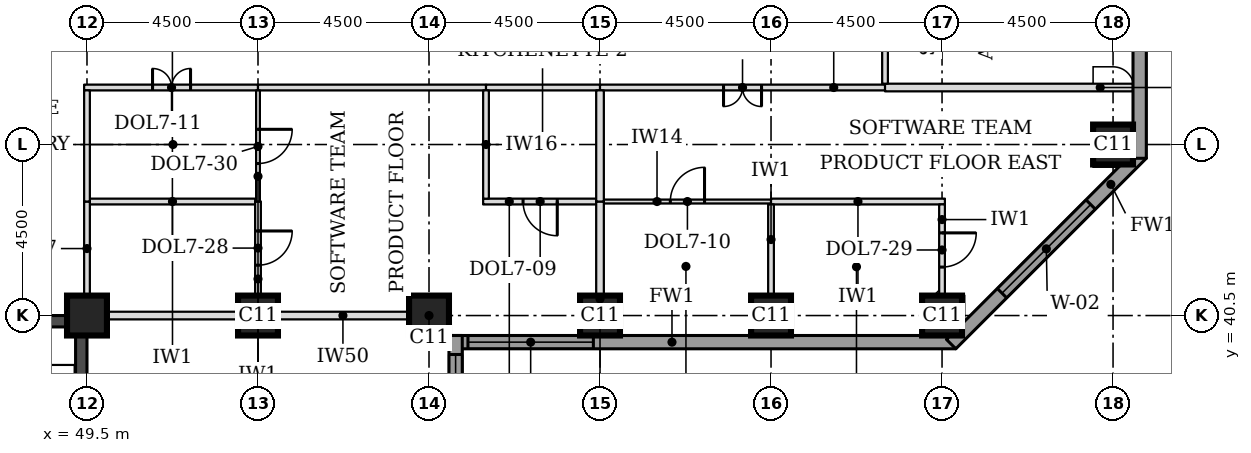
"""IFC4 building model, lengths in metres.
Left out: names, types, materials, properties, quantities, classifications, styles, units other than length and angle.
Written with IfcOpenShell. Run it as: python <this file> out.ifc"""

import sys

from ifc_helpers import new_model, si_unit, direction, frame, frame_2d, origin, origin_2d, place, context, subcontext, project, spatial, rectangle, extrude, element, fill, save


model = new_model("IFC4")
c1 = context("Model", 3, precision=1e-05, world=origin(), true_north=direction((0.0, 1.0)))
c2 = subcontext(c1, "Body", "Model", "MODEL_VIEW")
j1 = project(units=[si_unit("LENGTHUNIT", "METRE"), si_unit("PLANEANGLEUNIT", "RADIAN")], contexts=[c1])
p1 = place(None, origin())
s1 = spatial("IfcSite", under=j1, at=p1, CompositionType="ELEMENT")
p2 = place(p1, origin())
s2 = spatial("IfcBuilding", under=s1, at=p2, CompositionType="ELEMENT")
p3 = place(p2, frame((0.0, 0.0, 130.7)))
s3 = spatial("IfcBuildingStorey", under=s2, at=p3, CompositionType="ELEMENT", Elevation=130.7)
for number, where, z_axis, x_axis in (
    (1, (49.5, 40.5, 0.0), (0.0, 0.0, 1.0), (1.0, 0.0, 0.0)),
    (2, (54.0, 40.5, 0.0), (0.0, 0.0, 1.0), (1.0, 0.0, 0.0)),
    (3, (58.5, 40.5, 0.0), (0.0, 0.0, 1.0), (1.0, 0.0, 0.0)),
    (4, (63.0, 40.5, 0.0), (0.0, 0.0, 1.0), (1.0, 0.0, 0.0)),
    (5, (67.5, 40.5, 0.0), (0.0, 0.0, 1.0), (1.0, 0.0, 0.0)),
    (6, (72.0, 40.5, 0.0), (0.0, 0.0, 1.0), (1.0, 0.0, 0.0)),
    (7, (76.5, 45.0, 0.0), (0.0, 0.0, 1.0), (1.0, 0.0, 0.0)),
):
    element("IfcColumn", number, at=place(p3, frame(where, z_axis=z_axis, x_axis=x_axis)), inside=s3, PredefinedType="COLUMN", context=c2, shape_type="SweptSolid", body=[
        extrude(rectangle(XDim=1.05, YDim=1.05, at=origin_2d()), origin(), (0.0, 0.0, 1.0), 3.7),
    ])
p4 = place(p3, frame((40.8, 40.35, 0.0), z_axis=(0.0, 0.0, 1.0), x_axis=(1.0, 0.0, 0.0)))
e8 = element("IfcWall", 8, at=p4, inside=s3, PredefinedType="SHEAR", context=c2, shape_type="SweptSolid", body=[
    extrude(rectangle(XDim=8.4, YDim=0.3, at=frame_2d((4.2, 0.0))), origin(), (0.0, 0.0, 1.0), 3.7),
])
p5 = place(p4, frame((6.4, 0.0, 0.0)))
e9 = element("IfcOpeningElement", 9, at=p5, cuts=e8, PredefinedType="OPENING", context=c2, shape_type="SweptSolid", body=[
    extrude(rectangle(XDim=1.1, YDim=2.1, at=frame_2d((0.55, 1.05))), frame((0.0, 0.16, 0.0), z_axis=(0.0, -1.0, 0.0), x_axis=(1.0, 0.0, 0.0)), (0.0, 0.0, 1.0), 0.32),
])
p6 = place(p3, frame((49.35, 31.5, 0.0), z_axis=(0.0, 0.0, 1.0), x_axis=(0.0, 1.0, 0.0)))
e10 = element("IfcWall", 10, at=p6, inside=s3, PredefinedType="SHEAR", context=c2, shape_type="SweptSolid", body=[
    extrude(rectangle(XDim=9.0, YDim=0.3, at=frame_2d((4.5, 0.0))), origin(), (0.0, 0.0, 1.0), 3.7),
])
p7 = place(p3, frame((59.025, 39.8, 0.0), z_axis=(0.0, 0.0, 1.0), x_axis=(1.0, 0.0, 0.0)))
e11 = element("IfcWall", 11, at=p7, inside=s3, PredefinedType="STANDARD", context=c2, shape_type="SweptSolid", body=[
    extrude(rectangle(XDim=13.337, YDim=0.35, at=frame_2d((6.669, 0.0))), origin(), (0.0, 0.0, 1.0), 3.525),
])
p8 = place(p7, frame((0.5, 0.0, 0.9)))
e12 = element("IfcOpeningElement", 12, at=p8, cuts=e11, PredefinedType="OPENING", context=c2, shape_type="SweptSolid", body=[
    extrude(rectangle(XDim=3.3, YDim=1.9, at=frame_2d((1.65, 0.95))), frame((0.0, 0.185, 0.0), z_axis=(0.0, -1.0, 0.0), x_axis=(1.0, 0.0, 0.0)), (0.0, 0.0, 1.0), 0.37),
])
p9 = place(p3, frame((72.239, 39.749, 0.0), z_axis=(0.0, 0.0, 1.0), x_axis=(0.707106781187, 0.707106781187, 0.0)))
e13 = element("IfcWall", 13, at=p9, inside=s3, PredefinedType="STANDARD", context=c2, shape_type="SweptSolid", body=[
    extrude(rectangle(XDim=7.089, YDim=0.35, at=frame_2d((3.544, 0.0))), origin(), (0.0, 0.0, 1.0), 3.525),
])
p10 = place(p9, frame((1.894, 0.0, 0.9)))
e14 = element("IfcOpeningElement", 14, at=p10, cuts=e13, PredefinedType="OPENING", context=c2, shape_type="SweptSolid", body=[
    extrude(rectangle(XDim=3.3, YDim=1.9, at=frame_2d((1.65, 0.95))), frame((0.0, 0.185, 0.0), z_axis=(0.0, -1.0, 0.0), x_axis=(1.0, 0.0, 0.0)), (0.0, 0.0, 1.0), 0.37),
])
p11 = place(p3, frame((77.2, 44.638, 0.0), z_axis=(0.0, 0.0, 1.0), x_axis=(0.0, 1.0, 0.0)))
e15 = element("IfcWall", 15, at=p11, inside=s3, PredefinedType="STANDARD", context=c2, shape_type="SweptSolid", body=[
    extrude(rectangle(XDim=32.225, YDim=0.35, at=frame_2d((16.112, 0.0))), origin(), (0.0, 0.0, 1.0), 3.525),
])
p12 = place(p11, frame((5.462, 0.0, 0.9)))
e16 = element("IfcOpeningElement", 16, at=p12, cuts=e15, PredefinedType="OPENING", context=c2, shape_type="SweptSolid", body=[
    extrude(rectangle(XDim=3.3, YDim=1.9, at=frame_2d((1.65, 0.95))), frame((0.0, 0.185, 0.0), z_axis=(0.0, -1.0, 0.0), x_axis=(1.0, 0.0, 0.0)), (0.0, 0.0, 1.0), 0.37),
])
p13 = place(p11, frame((9.962, 0.0, 0.9)))
e17 = element("IfcOpeningElement", 17, at=p13, cuts=e15, PredefinedType="OPENING", context=c2, shape_type="SweptSolid", body=[
    extrude(rectangle(XDim=3.3, YDim=1.9, at=frame_2d((1.65, 0.95))), frame((0.0, 0.185, 0.0), z_axis=(0.0, -1.0, 0.0), x_axis=(1.0, 0.0, 0.0)), (0.0, 0.0, 1.0), 0.37),
])
p14 = place(p11, frame((14.462, 0.0, 0.9)))
e18 = element("IfcOpeningElement", 18, at=p14, cuts=e15, PredefinedType="OPENING", context=c2, shape_type="SweptSolid", body=[
    extrude(rectangle(XDim=3.3, YDim=1.9, at=frame_2d((1.65, 0.95))), frame((0.0, 0.185, 0.0), z_axis=(0.0, -1.0, 0.0), x_axis=(1.0, 0.0, 0.0)), (0.0, 0.0, 1.0), 0.37),
])
p15 = place(p11, frame((18.962, 0.0, 0.9)))
e19 = element("IfcOpeningElement", 19, at=p15, cuts=e15, PredefinedType="OPENING", context=c2, shape_type="SweptSolid", body=[
    extrude(rectangle(XDim=3.3, YDim=1.9, at=frame_2d((1.65, 0.95))), frame((0.0, 0.185, 0.0), z_axis=(0.0, -1.0, 0.0), x_axis=(1.0, 0.0, 0.0)), (0.0, 0.0, 1.0), 0.37),
])
p16 = place(p11, frame((23.462, 0.0, 0.9)))
e20 = element("IfcOpeningElement", 20, at=p16, cuts=e15, PredefinedType="OPENING", context=c2, shape_type="SweptSolid", body=[
    extrude(rectangle(XDim=3.3, YDim=1.9, at=frame_2d((1.65, 0.95))), frame((0.0, 0.185, 0.0), z_axis=(0.0, -1.0, 0.0), x_axis=(1.0, 0.0, 0.0)), (0.0, 0.0, 1.0), 0.37),
])
p17 = place(p3, frame((59.2, 22.138, 0.0), z_axis=(0.0, 0.0, 1.0), x_axis=(0.0, 1.0, 0.0)))
e21 = element("IfcWall", 21, at=p17, inside=s3, PredefinedType="STANDARD", context=c2, shape_type="SweptSolid", body=[
    extrude(rectangle(XDim=17.837, YDim=0.35, at=frame_2d((8.919, 0.0))), origin(), (0.0, 0.0, 1.0), 3.525),
])
p18 = place(p17, frame((5.462, 0.0, 0.9)))
e22 = element("IfcOpeningElement", 22, at=p18, cuts=e21, PredefinedType="OPENING", context=c2, shape_type="SweptSolid", body=[
    extrude(rectangle(XDim=3.3, YDim=1.9, at=frame_2d((1.65, 0.95))), frame((0.0, 0.185, 0.0), z_axis=(0.0, -1.0, 0.0), x_axis=(1.0, 0.0, 0.0)), (0.0, 0.0, 1.0), 0.37),
])
p19 = place(p17, frame((14.037, 0.0, 0.9)))
e23 = element("IfcOpeningElement", 23, at=p19, cuts=e21, PredefinedType="OPENING", context=c2, shape_type="SweptSolid", body=[
    extrude(rectangle(XDim=3.3, YDim=1.9, at=frame_2d((1.65, 0.95))), frame((0.0, 0.185, 0.0), z_axis=(0.0, -1.0, 0.0), x_axis=(1.0, 0.0, 0.0)), (0.0, 0.0, 1.0), 0.37),
])
p20 = place(p3, frame((50.015, 40.5, 0.0), z_axis=(0.0, 0.0, 1.0), x_axis=(1.0, 0.0, 0.0)))
e24 = element("IfcWall", 24, at=p20, inside=s3, PredefinedType="PARTITIONING", context=c2, shape_type="SweptSolid", body=[
    extrude(rectangle(XDim=3.46, YDim=0.2, at=frame_2d((1.73, 0.0))), origin(), (0.0, 0.0, 1.0), 2.8),
])
p21 = place(p3, frame((54.495, 40.5, 0.0), z_axis=(0.0, 0.0, 1.0), x_axis=(1.0, 0.0, 0.0)))
e25 = element("IfcWall", 25, at=p21, inside=s3, PredefinedType="PARTITIONING", context=c2, shape_type="SweptSolid", body=[
    extrude(rectangle(XDim=3.48, YDim=0.2, at=frame_2d((1.74, 0.0))), origin(), (0.0, 0.0, 1.0), 2.8),
])
p22 = place(p3, frame((49.575, 43.5, 0.0), z_axis=(0.0, 0.0, 1.0), x_axis=(1.0, 0.0, 0.0)))
e26 = element("IfcWall", 26, at=p22, inside=s3, PredefinedType="PARTITIONING", context=c2, shape_type="SweptSolid", body=[
    extrude(rectangle(XDim=4.35, YDim=0.15, at=frame_2d((2.175, 0.0))), origin(), (0.0, 0.0, 1.0), 3.55),
])
p23 = place(p3, frame((59.925, 43.5, 0.0), z_axis=(0.0, 0.0, 1.0), x_axis=(1.0, 0.0, 0.0)))
e27 = element("IfcWall", 27, at=p23, inside=s3, PredefinedType="PARTITIONING", context=c2, shape_type="SweptSolid", body=[
    extrude(rectangle(XDim=2.975, YDim=0.15, at=frame_2d((1.487, 0.0))), origin(), (0.0, 0.0, 1.0), 3.55),
])
p24 = place(p23, frame((1.05, 0.0, 0.0)))
e28 = element("IfcOpeningElement", 28, at=p24, cuts=e27, PredefinedType="OPENING", context=c2, shape_type="SweptSolid", body=[
    extrude(rectangle(XDim=0.9, YDim=2.1, at=frame_2d((0.45, 1.05))), frame((0.0, 0.085, 0.0), z_axis=(0.0, -1.0, 0.0), x_axis=(1.0, 0.0, 0.0)), (0.0, 0.0, 1.0), 0.17),
])
p25 = place(p3, frame((63.1, 43.5, 0.0), z_axis=(0.0, 0.0, 1.0), x_axis=(1.0, 0.0, 0.0)))
e29 = element("IfcWall", 29, at=p25, inside=s3, PredefinedType="PARTITIONING", context=c2, shape_type="SweptSolid", body=[
    extrude(rectangle(XDim=4.4, YDim=0.1, at=frame_2d((2.2, 0.0))), origin(), (0.0, 0.0, 1.0), 3.55),
])
p26 = place(p25, frame((1.75, 0.0, 0.0)))
e30 = element("IfcOpeningElement", 30, at=p26, cuts=e29, PredefinedType="OPENING", context=c2, shape_type="SweptSolid", body=[
    extrude(rectangle(XDim=0.9, YDim=2.1, at=frame_2d((0.45, 1.05))), frame((0.0, 0.06, 0.0), z_axis=(0.0, -1.0, 0.0), x_axis=(1.0, 0.0, 0.0)), (0.0, 0.0, 1.0), 0.12),
])
p27 = place(p3, frame((67.5, 43.5, 0.0), z_axis=(0.0, 0.0, 1.0), x_axis=(1.0, 0.0, 0.0)))
e31 = element("IfcWall", 31, at=p27, inside=s3, PredefinedType="PARTITIONING", context=c2, shape_type="SweptSolid", body=[
    extrude(rectangle(XDim=4.575, YDim=0.15, at=frame_2d((2.288, 0.0))), origin(), (0.0, 0.0, 1.0), 3.55),
])
p28 = place(p3, frame((49.425, 46.5, 0.0), z_axis=(0.0, 0.0, 1.0), x_axis=(1.0, 0.0, 0.0)))
e32 = element("IfcWall", 32, at=p28, inside=s3, PredefinedType="PARTITIONING", context=c2, shape_type="SweptSolid", body=[
    extrude(rectangle(XDim=4.575, YDim=0.15, at=frame_2d((2.288, 0.0))), origin(), (0.0, 0.0, 1.0), 3.55),
])
p29 = place(p28, frame((1.8, 0.0, 0.0)))
e33 = element("IfcOpeningElement", 33, at=p29, cuts=e32, PredefinedType="OPENING", context=c2, shape_type="SweptSolid", body=[
    extrude(rectangle(XDim=1.0, YDim=2.1, at=frame_2d((0.5, 1.05))), frame((0.0, 0.085, 0.0), z_axis=(0.0, -1.0, 0.0), x_axis=(1.0, 0.0, 0.0)), (0.0, 0.0, 1.0), 0.17),
])
p30 = place(p3, frame((54.0, 46.5, 0.0), z_axis=(0.0, 0.0, 1.0), x_axis=(1.0, 0.0, 0.0)))
e34 = element("IfcWall", 34, at=p30, inside=s3, PredefinedType="PARTITIONING", context=c2, shape_type="SweptSolid", body=[
    extrude(rectangle(XDim=6.0, YDim=0.15, at=frame_2d((3.0, 0.0))), origin(), (0.0, 0.0, 1.0), 3.55),
])
p31 = place(p3, frame((60.0, 46.5, 0.0), z_axis=(0.0, 0.0, 1.0), x_axis=(1.0, 0.0, 0.0)))
e35 = element("IfcWall", 35, at=p31, inside=s3, PredefinedType="PARTITIONING", context=c2, shape_type="SweptSolid", body=[
    extrude(rectangle(XDim=3.0, YDim=0.15, at=frame_2d((1.5, 0.0))), origin(), (0.0, 0.0, 1.0), 3.55),
])
p32 = place(p3, frame((63.0, 46.5, 0.0), z_axis=(0.0, 0.0, 1.0), x_axis=(1.0, 0.0, 0.0)))
e36 = element("IfcWall", 36, at=p32, inside=s3, PredefinedType="PARTITIONING", context=c2, shape_type="SweptSolid", body=[
    extrude(rectangle(XDim=7.5, YDim=0.15, at=frame_2d((3.75, 0.0))), origin(), (0.0, 0.0, 1.0), 3.55),
])
p33 = place(p32, frame((3.25, 0.0, 0.0)))
e37 = element("IfcOpeningElement", 37, at=p33, cuts=e36, PredefinedType="OPENING", context=c2, shape_type="SweptSolid", body=[
    extrude(rectangle(XDim=1.0, YDim=2.1, at=frame_2d((0.5, 1.05))), frame((0.0, 0.085, 0.0), z_axis=(0.0, -1.0, 0.0), x_axis=(1.0, 0.0, 0.0)), (0.0, 0.0, 1.0), 0.17),
])
p34 = place(p3, frame((70.5, 46.5, 0.0), z_axis=(0.0, 0.0, 1.0), x_axis=(1.0, 0.0, 0.0)))
e38 = element("IfcWall", 38, at=p34, inside=s3, PredefinedType="PARTITIONING", context=c2, shape_type="SweptSolid", body=[
    extrude(rectangle(XDim=6.525, YDim=0.2, at=frame_2d((3.262, 0.0))), origin(), (0.0, 0.0, 1.0), 3.55),
])
p35 = place(p3, frame((63.0, 39.975, 0.0), z_axis=(0.0, 0.0, 1.0), x_axis=(0.0, 1.0, 0.0)))
e39 = element("IfcWall", 39, at=p35, inside=s3, PredefinedType="PARTITIONING", context=c2, shape_type="SweptSolid", body=[
    extrude(rectangle(XDim=3.525, YDim=0.2, at=frame_2d((1.762, 0.0))), origin(), (0.0, 0.0, 1.0), 3.55),
])
p36 = place(p3, frame((67.5, 39.975, 0.0), z_axis=(0.0, 0.0, 1.0), x_axis=(0.0, 1.0, 0.0)))
e40 = element("IfcWall", 40, at=p36, inside=s3, PredefinedType="PARTITIONING", context=c2, shape_type="SweptSolid", body=[
    extrude(rectangle(XDim=3.45, YDim=0.15, at=frame_2d((1.725, 0.0))), origin(), (0.0, 0.0, 1.0), 3.55),
])
p37 = place(p3, frame((49.5, 41.025, 0.0), z_axis=(0.0, 0.0, 1.0), x_axis=(0.0, 1.0, 0.0)))
e41 = element("IfcWall", 41, at=p37, inside=s3, PredefinedType="PARTITIONING", context=c2, shape_type="SweptSolid", body=[
    extrude(rectangle(XDim=2.475, YDim=0.15, at=frame_2d((1.238, 0.0))), origin(), (0.0, 0.0, 1.0), 3.55),
])
p38 = place(p3, frame((54.0, 41.025, 0.0), z_axis=(0.0, 0.0, 1.0), x_axis=(0.0, 1.0, 0.0)))
e42 = element("IfcWall", 42, at=p38, inside=s3, PredefinedType="PARTITIONING", context=c2, shape_type="SweptSolid", body=[
    extrude(rectangle(XDim=2.475, YDim=0.15, at=frame_2d((1.238, 0.0))), origin(), (0.0, 0.0, 1.0), 3.55),
])
p39 = place(p38, frame((0.8, 0.0, 0.0)))
e43 = element("IfcOpeningElement", 43, at=p39, cuts=e42, PredefinedType="OPENING", context=c2, shape_type="SweptSolid", body=[
    extrude(rectangle(XDim=0.9, YDim=2.1, at=frame_2d((0.45, 1.05))), frame((0.0, 0.085, 0.0), z_axis=(0.0, -1.0, 0.0), x_axis=(1.0, 0.0, 0.0)), (0.0, 0.0, 1.0), 0.17),
])
p40 = place(p3, frame((72.0, 41.025, 0.0), z_axis=(0.0, 0.0, 1.0), x_axis=(0.0, 1.0, 0.0)))
e44 = element("IfcWall", 44, at=p40, inside=s3, PredefinedType="PARTITIONING", context=c2, shape_type="SweptSolid", body=[
    extrude(rectangle(XDim=2.4, YDim=0.15, at=frame_2d((1.2, 0.0))), origin(), (0.0, 0.0, 1.0), 3.55),
])
p41 = place(p40, frame((0.75, 0.0, 0.0)))
e45 = element("IfcOpeningElement", 45, at=p41, cuts=e44, PredefinedType="OPENING", context=c2, shape_type="SweptSolid", body=[
    extrude(rectangle(XDim=0.9, YDim=2.1, at=frame_2d((0.45, 1.05))), frame((0.0, 0.085, 0.0), z_axis=(0.0, -1.0, 0.0), x_axis=(1.0, 0.0, 0.0)), (0.0, 0.0, 1.0), 0.17),
])
p42 = place(p3, frame((49.5, 43.5, 0.0), z_axis=(0.0, 0.0, 1.0), x_axis=(0.0, 1.0, 0.0)))
e46 = element("IfcWall", 46, at=p42, inside=s3, PredefinedType="PARTITIONING", context=c2, shape_type="SweptSolid", body=[
    extrude(rectangle(XDim=2.925, YDim=0.15, at=frame_2d((1.462, 0.0))), origin(), (0.0, 0.0, 1.0), 3.55),
])
p43 = place(p3, frame((54.0, 43.5, 0.0), z_axis=(0.0, 0.0, 1.0), x_axis=(0.0, 1.0, 0.0)))
e47 = element("IfcWall", 47, at=p43, inside=s3, PredefinedType="PARTITIONING", context=c2, shape_type="SweptSolid", body=[
    extrude(rectangle(XDim=2.925, YDim=0.1, at=frame_2d((1.462, 0.0))), origin(), (0.0, 0.0, 1.0), 3.55),
])
p44 = place(p43, frame((1.0, 0.0, 0.0)))
e48 = element("IfcOpeningElement", 48, at=p44, cuts=e47, PredefinedType="OPENING", context=c2, shape_type="SweptSolid", body=[
    extrude(rectangle(XDim=0.9, YDim=2.1, at=frame_2d((0.45, 1.05))), frame((0.0, 0.06, 0.0), z_axis=(0.0, -1.0, 0.0), x_axis=(1.0, 0.0, 0.0)), (0.0, 0.0, 1.0), 0.12),
])
p45 = place(p3, frame((63.0, 43.5, 0.0), z_axis=(0.0, 0.0, 1.0), x_axis=(0.0, 1.0, 0.0)))
e49 = element("IfcWall", 49, at=p45, inside=s3, PredefinedType="PARTITIONING", context=c2, shape_type="SweptSolid", body=[
    extrude(rectangle(XDim=2.925, YDim=0.2, at=frame_2d((1.462, 0.0))), origin(), (0.0, 0.0, 1.0), 3.55),
])
p46 = place(p3, frame((60.0, 43.575, 0.0), z_axis=(0.0, 0.0, 1.0), x_axis=(0.0, 1.0, 0.0)))
e50 = element("IfcWall", 50, at=p46, inside=s3, PredefinedType="PARTITIONING", context=c2, shape_type="SweptSolid", body=[
    extrude(rectangle(XDim=2.85, YDim=0.15, at=frame_2d((1.425, 0.0))), origin(), (0.0, 0.0, 1.0), 3.55),
])
p47 = place(p3, frame((70.5, 46.6, 0.0), z_axis=(0.0, 0.0, 1.0), x_axis=(0.0, 1.0, 0.0)))
e51 = element("IfcWall", 51, at=p47, inside=s3, PredefinedType="PARTITIONING", context=c2, shape_type="SweptSolid", body=[
    extrude(rectangle(XDim=13.4, YDim=0.15, at=frame_2d((6.7, 0.0))), origin(), (0.0, 0.0, 1.0), 3.55),
])
p48 = place(p47, frame((6.2, 0.0, 0.0)))
e52 = element("IfcOpeningElement", 52, at=p48, cuts=e51, PredefinedType="OPENING", context=c2, shape_type="SweptSolid", body=[
    extrude(rectangle(XDim=1.0, YDim=2.1, at=frame_2d((0.5, 1.05))), frame((0.0, 0.085, 0.0), z_axis=(0.0, -1.0, 0.0), x_axis=(1.0, 0.0, 0.0)), (0.0, 0.0, 1.0), 0.17),
])
p49 = place(p8, origin())
e53 = element("IfcWindow", 53, at=p49, inside=s3, PartitioningType="SINGLE_PANEL", PredefinedType="WINDOW", context=c2, shape_type="SweptSolid", body=[
    extrude(rectangle(XDim=3.3, YDim=1.9, at=frame_2d((1.65, 0.95))), frame((0.0, 0.085, 0.0), z_axis=(0.0, -1.0, 0.0), x_axis=(1.0, 0.0, 0.0)), (0.0, 0.0, 1.0), 0.06),
])
fill(e12, e53)
p50 = place(p10, origin())
e54 = element("IfcWindow", 54, at=p50, inside=s3, PartitioningType="SINGLE_PANEL", PredefinedType="WINDOW", context=c2, shape_type="SweptSolid", body=[
    extrude(rectangle(XDim=3.3, YDim=1.9, at=frame_2d((1.65, 0.95))), frame((0.0, 0.085, 0.0), z_axis=(0.0, -1.0, 0.0), x_axis=(1.0, 0.0, 0.0)), (0.0, 0.0, 1.0), 0.06),
])
fill(e14, e54)
p51 = place(p19, origin())
e55 = element("IfcWindow", 55, at=p51, inside=s3, PartitioningType="SINGLE_PANEL", PredefinedType="WINDOW", context=c2, shape_type="SweptSolid", body=[
    extrude(rectangle(XDim=3.3, YDim=1.9, at=frame_2d((1.65, 0.95))), frame((0.0, 0.085, 0.0), z_axis=(0.0, -1.0, 0.0), x_axis=(1.0, 0.0, 0.0)), (0.0, 0.0, 1.0), 0.06),
])
fill(e23, e55)
p52 = place(p29, origin())
e56 = element("IfcDoor", 56, at=p52, inside=s3, OperationType="DOUBLE_DOOR_SINGLE_SWING", PredefinedType="DOOR", context=c2, shape_type="SweptSolid", body=[
    extrude(rectangle(XDim=1.0, YDim=2.1, at=frame_2d((0.5, 1.05))), frame((0.0, 0.025, 0.0), z_axis=(0.0, -1.0, 0.0), x_axis=(1.0, 0.0, 0.0)), (0.0, 0.0, 1.0), 0.05),
])
fill(e33, e56)
p53 = place(p44, frame((0.9, 0.0, 0.0), z_axis=(0.0, 0.0, 1.0), x_axis=(-1.0, 0.0, 0.0)))
e57 = element("IfcDoor", 57, at=p53, inside=s3, OperationType="SINGLE_SWING_LEFT", PredefinedType="DOOR", context=c2, shape_type="SweptSolid", body=[
    extrude(rectangle(XDim=0.9, YDim=2.1, at=frame_2d((0.45, 1.05))), frame((0.0, 0.025, 0.0), z_axis=(0.0, -1.0, 0.0), x_axis=(1.0, 0.0, 0.0)), (0.0, 0.0, 1.0), 0.05),
])
fill(e48, e57)
p54 = place(p24, frame((0.9, 0.0, 0.0), z_axis=(0.0, 0.0, 1.0), x_axis=(-1.0, 0.0, 0.0)))
e58 = element("IfcDoor", 58, at=p54, inside=s3, OperationType="SINGLE_SWING_LEFT", PredefinedType="DOOR", context=c2, shape_type="SweptSolid", body=[
    extrude(rectangle(XDim=0.9, YDim=2.1, at=frame_2d((0.45, 1.05))), frame((0.0, 0.025, 0.0), z_axis=(0.0, -1.0, 0.0), x_axis=(1.0, 0.0, 0.0)), (0.0, 0.0, 1.0), 0.05),
])
fill(e28, e58)
p55 = place(p39, frame((0.9, 0.0, 0.0), z_axis=(0.0, 0.0, 1.0), x_axis=(-1.0, 0.0, 0.0)))
e59 = element("IfcDoor", 59, at=p55, inside=s3, OperationType="SINGLE_SWING_LEFT", PredefinedType="DOOR", context=c2, shape_type="SweptSolid", body=[
    extrude(rectangle(XDim=0.9, YDim=2.1, at=frame_2d((0.45, 1.05))), frame((0.0, 0.025, 0.0), z_axis=(0.0, -1.0, 0.0), x_axis=(1.0, 0.0, 0.0)), (0.0, 0.0, 1.0), 0.05),
])
fill(e43, e59)
p56 = place(p33, frame((1.0, 0.0, 0.0), z_axis=(0.0, 0.0, 1.0), x_axis=(-1.0, 0.0, 0.0)))
e60 = element("IfcDoor", 60, at=p56, inside=s3, OperationType="DOUBLE_DOOR_SINGLE_SWING", PredefinedType="DOOR", context=c2, shape_type="SweptSolid", body=[
    extrude(rectangle(XDim=1.0, YDim=2.1, at=frame_2d((0.5, 1.05))), frame((0.0, 0.025, 0.0), z_axis=(0.0, -1.0, 0.0), x_axis=(1.0, 0.0, 0.0)), (0.0, 0.0, 1.0), 0.05),
])
fill(e37, e60)
p57 = place(p26, origin())
e61 = element("IfcDoor", 61, at=p57, inside=s3, OperationType="SINGLE_SWING_RIGHT", PredefinedType="DOOR", context=c2, shape_type="SweptSolid", body=[
    extrude(rectangle(XDim=0.9, YDim=2.1, at=frame_2d((0.45, 1.05))), frame((0.0, 0.025, 0.0), z_axis=(0.0, -1.0, 0.0), x_axis=(1.0, 0.0, 0.0)), (0.0, 0.0, 1.0), 0.05),
])
fill(e30, e61)
p58 = place(p41, frame((0.9, 0.0, 0.0), z_axis=(0.0, 0.0, 1.0), x_axis=(-1.0, 0.0, 0.0)))
e62 = element("IfcDoor", 62, at=p58, inside=s3, OperationType="SINGLE_SWING_LEFT", PredefinedType="DOOR", context=c2, shape_type="SweptSolid", body=[
    extrude(rectangle(XDim=0.9, YDim=2.1, at=frame_2d((0.45, 1.05))), frame((0.0, 0.025, 0.0), z_axis=(0.0, -1.0, 0.0), x_axis=(1.0, 0.0, 0.0)), (0.0, 0.0, 1.0), 0.05),
])
fill(e45, e62)
save(model, sys.argv[1])
